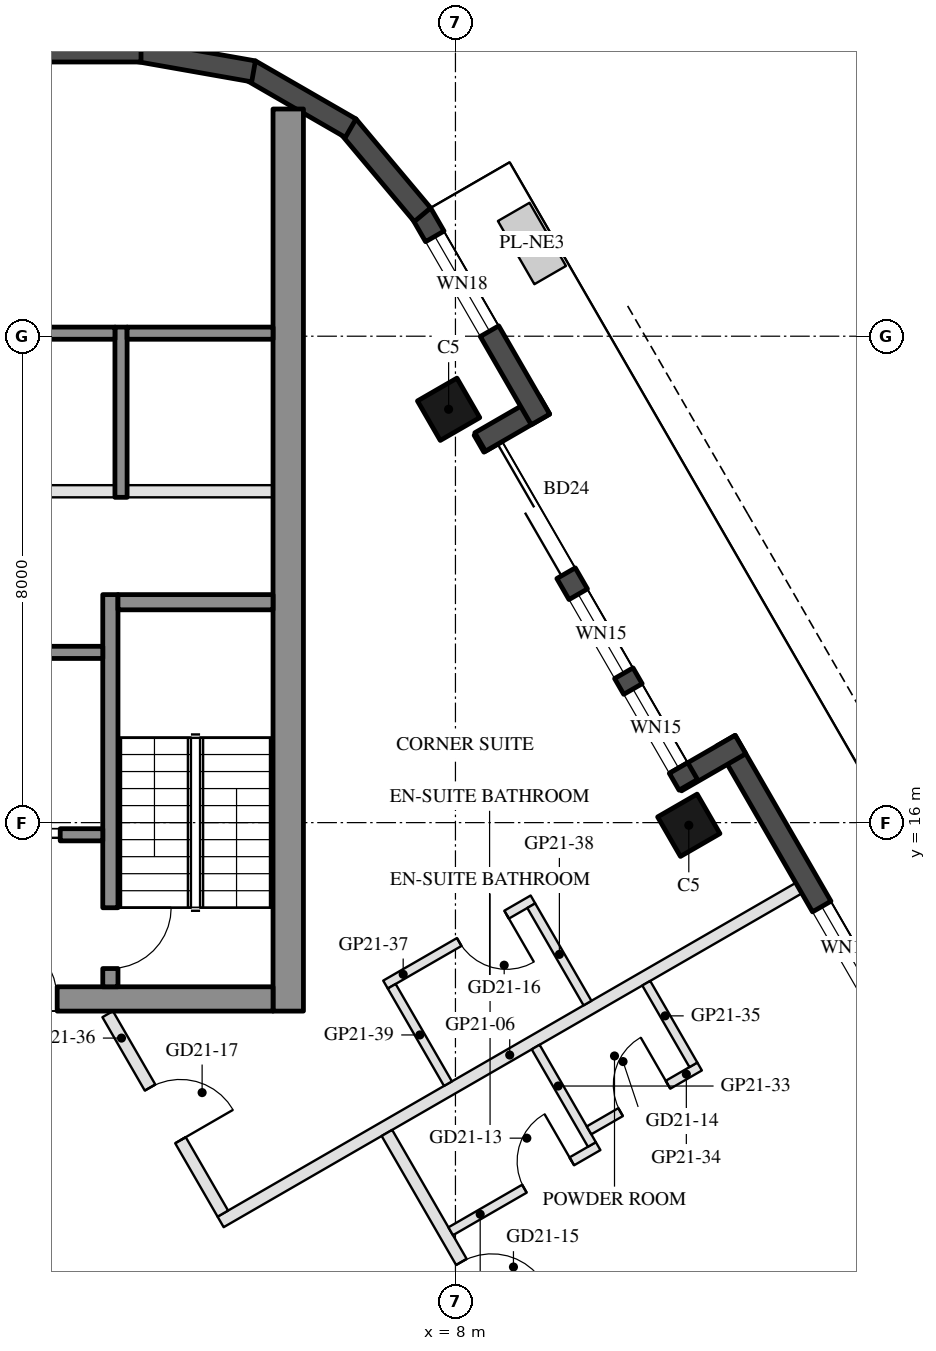
"""IFC4 building model, lengths in metres.
Left out: names, types, materials, properties, quantities, classifications, styles, units other than length and angle.
Written with IfcOpenShell. Run it as: python <this file> out.ifc"""

import sys

from ifc_helpers import new_model, si_unit, direction, frame, frame_2d, origin, origin_2d, place, context, subcontext, project, spatial, rectangle, hollow_rectangle, extrude, element, fill, save


model = new_model("IFC4")
c1 = context("Model", 3, precision=1e-05, world=origin(), true_north=direction((0.0, 1.0)))
c2 = subcontext(c1, "Body", "Model", "MODEL_VIEW")
j1 = project(units=[si_unit("LENGTHUNIT", "METRE"), si_unit("PLANEANGLEUNIT", "RADIAN")], contexts=[c1])
p1 = place(None, origin())
s1 = spatial("IfcSite", under=j1, at=p1, CompositionType="ELEMENT")
p2 = place(p1, origin())
s2 = spatial("IfcBuilding", under=s1, at=p2, CompositionType="ELEMENT")
p3 = place(p2, frame((0.0, 0.0, 216.9)))
s3 = spatial("IfcBuildingStorey", under=s2, at=p3, CompositionType="ELEMENT", Elevation=216.9)
for number, where, z_axis, x_axis in (
    (1, (11.838, 15.957, 0.0), (0.0, 0.0, 1.0), (-0.5, 0.866, 0.0)),
    (2, (7.888, 22.798, 0.0), (0.0, 0.0, 1.0), (-0.5, 0.866, 0.0)),
):
    element("IfcColumn", number, at=place(p3, frame(where, z_axis=z_axis, x_axis=x_axis)), inside=s3, PredefinedType="COLUMN", context=c2, shape_type="SweptSolid", body=[
        extrude(hollow_rectangle(XDim=0.75, YDim=0.75, WallThickness=0.035, at=origin_2d()), origin(), (0.0, 0.0, 1.0), 3.7),
    ])
p4 = place(p3, frame((17.299, 8.948, 0.0), z_axis=(0.0, 0.0, 1.0), x_axis=(-0.500010041276, 0.866019606374, 0.0)))
e3 = element("IfcWall", 3, at=p4, inside=s3, PredefinedType="SOLIDWALL", context=c2, shape_type="SweptSolid", body=[
    extrude(rectangle(XDim=9.7, YDim=0.35, at=frame_2d((4.85, 0.0))), origin(), (0.0, 0.0, 1.0), 3.55),
])
p5 = place(p4, frame((1.625, 0.0, 0.3)))
e4 = element("IfcOpeningElement", 4, at=p5, cuts=e3, PredefinedType="OPENING", context=c2, shape_type="SweptSolid", body=[
    extrude(rectangle(XDim=2.6, YDim=2.65, at=frame_2d((1.3, 1.325))), frame((0.0, 0.185, 0.0), z_axis=(0.0, -1.0, 0.0), x_axis=(1.0, 0.0, 0.0)), (0.0, 0.0, 1.0), 0.37),
])
p6 = place(p4, frame((4.949, 0.0, 0.3)))
e5 = element("IfcOpeningElement", 5, at=p6, cuts=e3, PredefinedType="OPENING", context=c2, shape_type="SweptSolid", body=[
    extrude(rectangle(XDim=1.6, YDim=2.65, at=frame_2d((0.8, 1.325))), frame((0.0, 0.185, 0.0), z_axis=(0.0, -1.0, 0.0), x_axis=(1.0, 0.0, 0.0)), (0.0, 0.0, 1.0), 0.37),
])
p7 = place(p3, frame((12.688, 17.284, 0.0), z_axis=(0.0, 0.0, 1.0), x_axis=(-0.865955602162, -0.500120880472, 0.0)))
e6 = element("IfcWall", 6, at=p7, inside=s3, PredefinedType="SOLIDWALL", context=c2, shape_type="SweptSolid", body=[
    extrude(rectangle(XDim=1.22, YDim=0.35, at=frame_2d((0.61, 0.0))), origin(), (0.0, 0.0, 1.0), 3.55),
])
p8 = place(p3, frame((11.829, 16.621, 0.0), z_axis=(0.0, 0.0, 1.0), x_axis=(-0.500003597184, 0.866023326939, 0.0)))
e7 = element("IfcWall", 7, at=p8, inside=s3, PredefinedType="SOLIDWALL", context=c2, shape_type="SweptSolid", body=[
    extrude(rectangle(XDim=6.74, YDim=0.35, at=frame_2d((3.37, 0.0))), origin(), (0.0, 0.0, 1.0), 3.55),
])
p9 = place(p8, frame((4.02, 0.0, 0.0)))
e8 = element("IfcOpeningElement", 8, at=p9, cuts=e7, PredefinedType="OPENING", context=c2, shape_type="SweptSolid", body=[
    extrude(rectangle(XDim=2.4, YDim=2.4, at=frame_2d((1.2, 1.2))), frame((0.0, 0.185, 0.0), z_axis=(0.0, -1.0, 0.0), x_axis=(1.0, 0.0, 0.0)), (0.0, 0.0, 1.0), 0.37),
])
p10 = place(p8, frame((0.32, 0.0, 0.3)))
e9 = element("IfcOpeningElement", 9, at=p10, cuts=e7, PredefinedType="OPENING", context=c2, shape_type="SweptSolid", body=[
    extrude(rectangle(XDim=1.5, YDim=2.65, at=frame_2d((0.75, 1.325))), frame((0.0, 0.185, 0.0), z_axis=(0.0, -1.0, 0.0), x_axis=(1.0, 0.0, 0.0)), (0.0, 0.0, 1.0), 0.37),
])
p11 = place(p8, frame((2.12, 0.0, 0.3)))
e10 = element("IfcOpeningElement", 10, at=p11, cuts=e7, PredefinedType="OPENING", context=c2, shape_type="SweptSolid", body=[
    extrude(rectangle(XDim=1.5, YDim=2.65, at=frame_2d((0.75, 1.325))), frame((0.0, 0.185, 0.0), z_axis=(0.0, -1.0, 0.0), x_axis=(1.0, 0.0, 0.0)), (0.0, 0.0, 1.0), 0.37),
])
p12 = place(p3, frame((8.406, 22.26, 0.0), z_axis=(0.0, 0.0, 1.0), x_axis=(0.865955602162, 0.500120880472, 0.0)))
e11 = element("IfcWall", 11, at=p12, inside=s3, PredefinedType="SOLIDWALL", context=c2, shape_type="SweptSolid", body=[
    extrude(rectangle(XDim=1.22, YDim=0.35, at=frame_2d((0.61, 0.0))), origin(), (0.0, 0.0, 1.0), 3.55),
])
p13 = place(p3, frame((9.398, 22.631, 0.0), z_axis=(0.0, 0.0, 1.0), x_axis=(-0.499954521343, 0.866051659307, 0.0)))
e12 = element("IfcWall", 12, at=p13, inside=s3, PredefinedType="SOLIDWALL", context=c2, shape_type="SweptSolid", body=[
    extrude(rectangle(XDim=3.916, YDim=0.35, at=frame_2d((1.958, 0.0))), origin(), (0.0, 0.0, 1.0), 3.55),
])
p14 = place(p13, frame((1.676, 0.0, 0.3)))
e13 = element("IfcOpeningElement", 13, at=p14, cuts=e12, PredefinedType="OPENING", context=c2, shape_type="SweptSolid", body=[
    extrude(rectangle(XDim=1.8, YDim=2.65, at=frame_2d((0.9, 1.325))), frame((0.0, 0.185, 0.0), z_axis=(0.0, -1.0, 0.0), x_axis=(1.0, 0.0, 0.0)), (0.0, 0.0, 1.0), 0.37),
])
p15 = place(p3, frame((7.458, 25.998, 0.0), z_axis=(0.0, 0.0, 1.0), x_axis=(-0.642808304945, 0.766027077259, 0.0)))
e14 = element("IfcWall", 14, at=p15, inside=s3, PredefinedType="SOLIDWALL", context=c2, shape_type="SweptSolid", body=[
    extrude(rectangle(XDim=1.91, YDim=0.35, at=frame_2d((0.955, 0.0))), origin(), (0.0, 0.0, 1.0), 3.55),
])
for number, where, z_axis, x_axis in (
    (15, (6.277, 27.422, 0.0), (0.0, 0.0, 1.0), (-0.866, 0.5, 0.0)),
    (16, (4.68, 28.356, 0.0), (0.0, 0.0, 1.0), (-0.985, 0.174, 0.0)),
):
    element("IfcWall", number, at=place(p3, frame(where, z_axis=z_axis, x_axis=x_axis)), inside=s3, PredefinedType="SOLIDWALL", context=c2, shape_type="SweptSolid", body=[
        extrude(rectangle(XDim=1.91, YDim=0.35, at=frame_2d((0.955, 0.0))), origin(), (0.0, 0.0, 1.0), 3.55),
    ])
p16 = place(p3, frame((2.829, 28.685, 0.0), z_axis=(0.0, 0.0, 1.0), x_axis=(-1.0, 0.0, 0.0)))
e17 = element("IfcWall", 17, at=p16, inside=s3, PredefinedType="SOLIDWALL", context=c2, shape_type="SweptSolid", body=[
    extrude(rectangle(XDim=5.658, YDim=0.35, at=frame_2d((2.829, 0.0))), origin(), (0.0, 0.0, 1.0), 3.55),
])
p17 = place(p3, frame((5.25, 12.9, 0.0), z_axis=(0.0, 0.0, 1.0), x_axis=(0.0, 1.0, 0.0)))
e18 = element("IfcWall", 18, at=p17, inside=s3, PredefinedType="SHEAR", context=c2, shape_type="SweptSolid", body=[
    extrude(rectangle(XDim=14.837, YDim=0.5, at=frame_2d((7.418, 0.0))), origin(), (0.0, 0.0, 1.0), 3.5),
])
p18 = place(p3, frame((5.0, 13.1, 0.0), z_axis=(0.0, 0.0, 1.0), x_axis=(-1.0, 0.0, 0.0)))
e19 = element("IfcWall", 19, at=p18, inside=s3, PredefinedType="SHEAR", context=c2, shape_type="SweptSolid", body=[
    extrude(rectangle(XDim=10.0, YDim=0.4, at=frame_2d((5.0, 0.0))), origin(), (0.0, 0.0, 1.0), 3.5),
])
p19 = place(p18, frame((3.55, 0.0, 0.0)))
e20 = element("IfcOpeningElement", 20, at=p19, cuts=e19, PredefinedType="OPENING", context=c2, shape_type="SweptSolid", body=[
    extrude(rectangle(XDim=1.1, YDim=2.1, at=frame_2d((0.55, 1.05))), frame((0.0, 0.21, 0.0), z_axis=(0.0, -1.0, 0.0), x_axis=(1.0, 0.0, 0.0)), (0.0, 0.0, 1.0), 0.42),
])
p20 = place(p18, frame((5.85, 0.0, 0.0)))
e21 = element("IfcOpeningElement", 21, at=p20, cuts=e19, PredefinedType="OPENING", context=c2, shape_type="SweptSolid", body=[
    extrude(rectangle(XDim=1.4, YDim=2.1, at=frame_2d((0.7, 1.05))), frame((0.0, 0.21, 0.0), z_axis=(0.0, -1.0, 0.0), x_axis=(1.0, 0.0, 0.0)), (0.0, 0.0, 1.0), 0.42),
])
p21 = place(p3, frame((2.325, 13.3, 0.0), z_axis=(0.0, 0.0, 1.0), x_axis=(0.0, 1.0, 0.0)))
e22 = element("IfcWall", 22, at=p21, inside=s3, PredefinedType="SHEAR", context=c2, shape_type="SweptSolid", body=[
    extrude(rectangle(XDim=6.45, YDim=0.25, at=frame_2d((3.225, 0.0))), origin(), (0.0, 0.0, 1.0), 3.5),
])
p22 = place(p21, frame((0.3, 0.0, 0.0)))
e23 = element("IfcOpeningElement", 23, at=p22, cuts=e22, PredefinedType="OPENING", context=c2, shape_type="SweptSolid", body=[
    extrude(rectangle(XDim=1.0, YDim=2.1, at=frame_2d((0.5, 1.05))), frame((0.0, 0.135, 0.0), z_axis=(0.0, -1.0, 0.0), x_axis=(1.0, 0.0, 0.0)), (0.0, 0.0, 1.0), 0.27),
])
p23 = place(p3, frame((5.0, 19.625, 0.0), z_axis=(0.0, 0.0, 1.0), x_axis=(-1.0, 0.0, 0.0)))
e24 = element("IfcWall", 24, at=p23, inside=s3, PredefinedType="SHEAR", context=c2, shape_type="SweptSolid", body=[
    extrude(rectangle(XDim=2.55, YDim=0.25, at=frame_2d((1.275, 0.0))), origin(), (0.0, 0.0, 1.0), 3.5),
])
p24 = place(p3, frame((2.2, 18.8, 0.0), z_axis=(0.0, 0.0, 1.0), x_axis=(-1.0, 0.0, 0.0)))
e25 = element("IfcWall", 25, at=p24, inside=s3, PredefinedType="SHEAR", context=c2, shape_type="SweptSolid", body=[
    extrude(rectangle(XDim=2.8, YDim=0.2, at=frame_2d((1.4, 0.0))), origin(), (0.0, 0.0, 1.0), 3.5),
])
p25 = place(p3, frame((2.2, 15.8, 0.0), z_axis=(0.0, 0.0, 1.0), x_axis=(-1.0, 0.0, 0.0)))
e26 = element("IfcWall", 26, at=p25, inside=s3, PredefinedType="SHEAR", context=c2, shape_type="SweptSolid", body=[
    extrude(rectangle(XDim=2.8, YDim=0.2, at=frame_2d((1.4, 0.0))), origin(), (0.0, 0.0, 1.0), 3.5),
])
p26 = place(p25, frame((0.7, 0.0, 0.0)))
e27 = element("IfcOpeningElement", 27, at=p26, cuts=e26, PredefinedType="OPENING", context=c2, shape_type="SweptSolid", body=[
    extrude(rectangle(XDim=1.2, YDim=2.1, at=frame_2d((0.6, 1.05))), frame((0.0, 0.11, 0.0), z_axis=(0.0, -1.0, 0.0), x_axis=(1.0, 0.0, 0.0)), (0.0, 0.0, 1.0), 0.22),
])
p27 = place(p3, frame((2.5, 21.35, 0.0), z_axis=(0.0, 0.0, 1.0), x_axis=(0.0, 1.0, 0.0)))
e28 = element("IfcWall", 28, at=p27, inside=s3, PredefinedType="SHEAR", context=c2, shape_type="SweptSolid", body=[
    extrude(rectangle(XDim=2.8, YDim=0.2, at=frame_2d((1.4, 0.0))), origin(), (0.0, 0.0, 1.0), 3.5),
])
p28 = place(p3, frame((5.0, 24.05, 0.0), z_axis=(0.0, 0.0, 1.0), x_axis=(-1.0, 0.0, 0.0)))
e29 = element("IfcWall", 29, at=p28, inside=s3, PredefinedType="SHEAR", context=c2, shape_type="SweptSolid", body=[
    extrude(rectangle(XDim=2.4, YDim=0.2, at=frame_2d((1.2, 0.0))), origin(), (0.0, 0.0, 1.0), 3.5),
])
p29 = place(p3, frame((2.4, 24.05, 0.0), z_axis=(0.0, 0.0, 1.0), x_axis=(-1.0, 0.0, 0.0)))
e30 = element("IfcWall", 30, at=p29, inside=s3, PredefinedType="SHEAR", context=c2, shape_type="SweptSolid", body=[
    extrude(rectangle(XDim=2.8, YDim=0.2, at=frame_2d((1.4, 0.0))), origin(), (0.0, 0.0, 1.0), 3.5),
])
p30 = place(p3, frame((5.0, 21.45, 0.0), z_axis=(0.0, 0.0, 1.0), x_axis=(-1.0, 0.0, 0.0)))
e31 = element("IfcWall", 31, at=p30, inside=s3, PredefinedType="PARTITIONING", context=c2, shape_type="SweptSolid", body=[
    extrude(rectangle(XDim=2.4, YDim=0.2, at=frame_2d((1.2, 0.0))), origin(), (0.0, 0.0, 1.0), 3.5),
])
p31 = place(p3, frame((2.4, 21.45, 0.0), z_axis=(0.0, 0.0, 1.0), x_axis=(-1.0, 0.0, 0.0)))
e32 = element("IfcWall", 32, at=p31, inside=s3, PredefinedType="PARTITIONING", context=c2, shape_type="SweptSolid", body=[
    extrude(rectangle(XDim=2.8, YDim=0.2, at=frame_2d((1.4, 0.0))), origin(), (0.0, 0.0, 1.0), 3.5),
])
p32 = place(p3, frame((13.647, 14.923, 0.0), z_axis=(0.0, 0.0, 1.0), x_axis=(-0.866027479907, -0.499996404033, 0.0)))
e33 = element("IfcWall", 33, at=p32, inside=s3, PredefinedType="PARTITIONING", context=c2, shape_type="SweptSolid", body=[
    extrude(rectangle(XDim=10.98, YDim=0.2, at=frame_2d((5.49, 0.0))), origin(), (0.0, 0.0, 1.0), 3.06),
])
p33 = place(p3, frame((6.873, 10.896, 0.0), z_axis=(0.0, 0.0, 1.0), x_axis=(0.499996545922, -0.866027397988, 0.0)))
e34 = element("IfcWall", 34, at=p33, inside=s3, PredefinedType="PARTITIONING", context=c2, shape_type="SweptSolid", body=[
    extrude(rectangle(XDim=11.0, YDim=0.2, at=frame_2d((5.5, 0.0))), origin(), (0.0, 0.0, 1.0), 2.95),
])
p34 = place(p33, frame((2.45, 0.0, 0.0)))
e35 = element("IfcOpeningElement", 35, at=p34, cuts=e34, PredefinedType="OPENING", context=c2, shape_type="SweptSolid", body=[
    extrude(rectangle(XDim=1.0, YDim=2.1, at=frame_2d((0.5, 1.05))), frame((0.0, 0.11, 0.0), z_axis=(0.0, -1.0, 0.0), x_axis=(1.0, 0.0, 0.0)), (0.0, 0.0, 1.0), 0.22),
])
p35 = place(p3, frame((7.922, 9.279, 0.0), z_axis=(0.0, 0.0, 1.0), x_axis=(0.865996816683, 0.500049511043, 0.0)))
e36 = element("IfcWall", 36, at=p35, inside=s3, PredefinedType="PARTITIONING", context=c2, shape_type="SweptSolid", body=[
    extrude(rectangle(XDim=2.8, YDim=0.15, at=frame_2d((1.4, 0.0))), origin(), (0.0, 0.0, 1.0), 2.95),
])
p36 = place(p35, frame((1.4, 0.0, 0.0)))
e37 = element("IfcOpeningElement", 37, at=p36, cuts=e36, PredefinedType="OPENING", context=c2, shape_type="SweptSolid", body=[
    extrude(rectangle(XDim=0.9, YDim=2.1, at=frame_2d((0.45, 1.05))), frame((0.0, 0.085, 0.0), z_axis=(0.0, -1.0, 0.0), x_axis=(1.0, 0.0, 0.0)), (0.0, 0.0, 1.0), 0.17),
])
p37 = place(p3, frame((10.244, 10.707, 0.0), z_axis=(0.0, 0.0, 1.0), x_axis=(-0.500042316284, 0.866000971088, 0.0)))
e38 = element("IfcWall", 38, at=p37, inside=s3, PredefinedType="PARTITIONING", context=c2, shape_type="SweptSolid", body=[
    extrude(rectangle(XDim=1.85, YDim=0.15, at=frame_2d((0.925, 0.0))), origin(), (0.0, 0.0, 1.0), 3.55),
])
p38 = place(p3, frame((10.197, 10.939, 0.0), z_axis=(0.0, 0.0, 1.0), x_axis=(0.866009402589, 0.500027713859, 0.0)))
e39 = element("IfcWall", 39, at=p38, inside=s3, PredefinedType="PARTITIONING", context=c2, shape_type="SweptSolid", body=[
    extrude(rectangle(XDim=2.1, YDim=0.15, at=frame_2d((1.05, 0.0))), origin(), (0.0, 0.0, 1.0), 3.55),
])
p39 = place(p38, frame((0.6, 0.0, 0.0)))
e40 = element("IfcOpeningElement", 40, at=p39, cuts=e39, PredefinedType="OPENING", context=c2, shape_type="SweptSolid", body=[
    extrude(rectangle(XDim=0.9, YDim=2.1, at=frame_2d((0.45, 1.05))), frame((0.0, 0.085, 0.0), z_axis=(0.0, -1.0, 0.0), x_axis=(1.0, 0.0, 0.0)), (0.0, 0.0, 1.0), 0.17),
])
p40 = place(p3, frame((11.913, 12.016, 0.0), z_axis=(0.0, 0.0, 1.0), x_axis=(-0.499967891604, 0.866043940782, 0.0)))
e41 = element("IfcWall", 41, at=p40, inside=s3, PredefinedType="PARTITIONING", context=c2, shape_type="SweptSolid", body=[
    extrude(rectangle(XDim=1.55, YDim=0.15, at=frame_2d((0.775, 0.0))), origin(), (0.0, 0.0, 1.0), 3.55),
])
p41 = place(p3, frame((2.281, 12.85, 0.0), z_axis=(0.0, 0.0, 1.0), x_axis=(0.499979074716, -0.866037484666, 0.0)))
e42 = element("IfcWall", 42, at=p41, inside=s3, PredefinedType="PARTITIONING", context=c2, shape_type="SweptSolid", body=[
    extrude(rectangle(XDim=3.788, YDim=0.2, at=frame_2d((1.894, 0.0))), origin(), (0.0, 0.0, 1.0), 2.95),
])
p42 = place(p41, frame((1.394, 0.0, 0.0)))
e43 = element("IfcOpeningElement", 43, at=p42, cuts=e42, PredefinedType="OPENING", context=c2, shape_type="SweptSolid", body=[
    extrude(rectangle(XDim=1.0, YDim=2.1, at=frame_2d((0.5, 1.05))), frame((0.0, 0.11, 0.0), z_axis=(0.0, -1.0, 0.0), x_axis=(1.0, 0.0, 0.0)), (0.0, 0.0, 1.0), 0.22),
])
p43 = place(p3, frame((9.274, 14.737, 0.0), z_axis=(0.0, 0.0, 1.0), x_axis=(-0.866018616679, -0.500011755427, 0.0)))
e44 = element("IfcWall", 44, at=p43, inside=s3, PredefinedType="PARTITIONING", context=c2, shape_type="SweptSolid", body=[
    extrude(rectangle(XDim=2.8, YDim=0.15, at=frame_2d((1.4, 0.0))), origin(), (0.0, 0.0, 1.0), 3.55),
])
p44 = place(p43, frame((0.5, 0.0, 0.0)))
e45 = element("IfcOpeningElement", 45, at=p44, cuts=e44, PredefinedType="OPENING", context=c2, shape_type="SweptSolid", body=[
    extrude(rectangle(XDim=0.9, YDim=2.1, at=frame_2d((0.45, 1.05))), frame((0.0, 0.085, 0.0), z_axis=(0.0, -1.0, 0.0), x_axis=(1.0, 0.0, 0.0)), (0.0, 0.0, 1.0), 0.17),
])
p45 = place(p3, frame((10.172, 13.032, 0.0), z_axis=(0.0, 0.0, 1.0), x_axis=(-0.500042316284, 0.866000971088, 0.0)))
e46 = element("IfcWall", 46, at=p45, inside=s3, PredefinedType="PARTITIONING", context=c2, shape_type="SweptSolid", body=[
    extrude(rectangle(XDim=1.85, YDim=0.15, at=frame_2d((0.925, 0.0))), origin(), (0.0, 0.0, 1.0), 2.95),
])
p46 = place(p3, frame((7.877, 11.707, 0.0), z_axis=(0.0, 0.0, 1.0), x_axis=(-0.499985172903, 0.866033964044, 0.0)))
e47 = element("IfcWall", 47, at=p46, inside=s3, PredefinedType="PARTITIONING", context=c2, shape_type="SweptSolid", body=[
    extrude(rectangle(XDim=1.85, YDim=0.15, at=frame_2d((0.925, 0.0))), origin(), (0.0, 0.0, 1.0), 2.95),
])
p47 = place(p6, origin())
e48 = element("IfcWindow", 48, at=p47, inside=s3, PartitioningType="SINGLE_PANEL", PredefinedType="WINDOW", context=c2, shape_type="SweptSolid", body=[
    extrude(rectangle(XDim=1.6, YDim=2.65, at=frame_2d((0.8, 1.325))), frame((0.0, 0.03, 0.0), z_axis=(0.0, -1.0, 0.0), x_axis=(1.0, 0.0, 0.0)), (0.0, 0.0, 1.0), 0.06),
])
fill(e5, e48)
p48 = place(p9, frame((2.4, 0.0, 0.0), z_axis=(0.0, 0.0, 1.0), x_axis=(-1.0, 0.0, 0.0)))
e49 = element("IfcDoor", 49, at=p48, inside=s3, OperationType="SLIDING_TO_LEFT", PredefinedType="DOOR", context=c2, shape_type="SweptSolid", body=[
    extrude(rectangle(XDim=2.4, YDim=2.4, at=frame_2d((1.2, 1.2))), frame((0.0, 0.025, 0.0), z_axis=(0.0, -1.0, 0.0), x_axis=(1.0, 0.0, 0.0)), (0.0, 0.0, 1.0), 0.05),
])
fill(e8, e49)
p49 = place(p10, origin())
e50 = element("IfcWindow", 50, at=p49, inside=s3, PartitioningType="SINGLE_PANEL", PredefinedType="WINDOW", context=c2, shape_type="SweptSolid", body=[
    extrude(rectangle(XDim=1.5, YDim=2.65, at=frame_2d((0.75, 1.325))), frame((0.0, 0.03, 0.0), z_axis=(0.0, -1.0, 0.0), x_axis=(1.0, 0.0, 0.0)), (0.0, 0.0, 1.0), 0.06),
])
fill(e9, e50)
p50 = place(p11, origin())
e51 = element("IfcWindow", 51, at=p50, inside=s3, PartitioningType="SINGLE_PANEL", PredefinedType="WINDOW", context=c2, shape_type="SweptSolid", body=[
    extrude(rectangle(XDim=1.5, YDim=2.65, at=frame_2d((0.75, 1.325))), frame((0.0, 0.03, 0.0), z_axis=(0.0, -1.0, 0.0), x_axis=(1.0, 0.0, 0.0)), (0.0, 0.0, 1.0), 0.06),
])
fill(e10, e51)
p51 = place(p14, origin())
e52 = element("IfcWindow", 52, at=p51, inside=s3, PartitioningType="SINGLE_PANEL", PredefinedType="WINDOW", context=c2, shape_type="SweptSolid", body=[
    extrude(rectangle(XDim=1.8, YDim=2.65, at=frame_2d((0.9, 1.325))), frame((0.0, 0.03, 0.0), z_axis=(0.0, -1.0, 0.0), x_axis=(1.0, 0.0, 0.0)), (0.0, 0.0, 1.0), 0.06),
])
fill(e13, e52)
p52 = place(p26, origin())
e53 = element("IfcDoor", 53, at=p52, inside=s3, OperationType="DOUBLE_DOOR_SLIDING", PredefinedType="DOOR", context=c2, shape_type="SweptSolid", body=[
    extrude(rectangle(XDim=1.2, YDim=2.1, at=frame_2d((0.6, 1.05))), frame((0.0, 0.025, 0.0), z_axis=(0.0, -1.0, 0.0), x_axis=(1.0, 0.0, 0.0)), (0.0, 0.0, 1.0), 0.05),
])
fill(e27, e53)
p53 = place(p19, frame((1.1, 0.0, 0.0), z_axis=(0.0, 0.0, 1.0), x_axis=(-1.0, 0.0, 0.0)))
e54 = element("IfcDoor", 54, at=p53, inside=s3, OperationType="SINGLE_SWING_LEFT", PredefinedType="DOOR", context=c2, shape_type="SweptSolid", body=[
    extrude(rectangle(XDim=1.1, YDim=2.1, at=frame_2d((0.55, 1.05))), frame((0.0, 0.025, 0.0), z_axis=(0.0, -1.0, 0.0), x_axis=(1.0, 0.0, 0.0)), (0.0, 0.0, 1.0), 0.05),
])
fill(e20, e54)
p54 = place(p22, frame((1.0, 0.0, 0.0), z_axis=(0.0, 0.0, 1.0), x_axis=(-1.0, 0.0, 0.0)))
e55 = element("IfcDoor", 55, at=p54, inside=s3, OperationType="SINGLE_SWING_LEFT", PredefinedType="DOOR", context=c2, shape_type="SweptSolid", body=[
    extrude(rectangle(XDim=1.0, YDim=2.1, at=frame_2d((0.5, 1.05))), frame((0.0, 0.025, 0.0), z_axis=(0.0, -1.0, 0.0), x_axis=(1.0, 0.0, 0.0)), (0.0, 0.0, 1.0), 0.05),
])
fill(e23, e55)
p55 = place(p36, origin())
e56 = element("IfcDoor", 56, at=p55, inside=s3, OperationType="SINGLE_SWING_RIGHT", PredefinedType="DOOR", context=c2, shape_type="SweptSolid", body=[
    extrude(rectangle(XDim=0.9, YDim=2.1, at=frame_2d((0.45, 1.05))), frame((0.0, 0.025, 0.0), z_axis=(0.0, -1.0, 0.0), x_axis=(1.0, 0.0, 0.0)), (0.0, 0.0, 1.0), 0.05),
])
fill(e37, e56)
p56 = place(p39, origin())
e57 = element("IfcDoor", 57, at=p56, inside=s3, OperationType="SINGLE_SWING_RIGHT", PredefinedType="DOOR", context=c2, shape_type="SweptSolid", body=[
    extrude(rectangle(XDim=0.9, YDim=2.1, at=frame_2d((0.45, 1.05))), frame((0.0, 0.025, 0.0), z_axis=(0.0, -1.0, 0.0), x_axis=(1.0, 0.0, 0.0)), (0.0, 0.0, 1.0), 0.05),
])
fill(e40, e57)
p57 = place(p34, origin())
e58 = element("IfcDoor", 58, at=p57, inside=s3, OperationType="SINGLE_SWING_RIGHT", PredefinedType="DOOR", context=c2, shape_type="SweptSolid", body=[
    extrude(rectangle(XDim=1.0, YDim=2.1, at=frame_2d((0.5, 1.05))), frame((0.0, 0.025, 0.0), z_axis=(0.0, -1.0, 0.0), x_axis=(1.0, 0.0, 0.0)), (0.0, 0.0, 1.0), 0.05),
])
fill(e35, e58)
p58 = place(p44, origin())
e59 = element("IfcDoor", 59, at=p58, inside=s3, OperationType="SINGLE_SWING_LEFT", PredefinedType="DOOR", context=c2, shape_type="SweptSolid", body=[
    extrude(rectangle(XDim=0.9, YDim=2.1, at=frame_2d((0.45, 1.05))), frame((0.0, 0.025, 0.0), z_axis=(0.0, -1.0, 0.0), x_axis=(1.0, 0.0, 0.0)), (0.0, 0.0, 1.0), 0.05),
])
fill(e45, e59)
p59 = place(p42, origin())
e60 = element("IfcDoor", 60, at=p59, inside=s3, OperationType="SINGLE_SWING_RIGHT", PredefinedType="DOOR", context=c2, shape_type="SweptSolid", body=[
    extrude(rectangle(XDim=1.0, YDim=2.1, at=frame_2d((0.5, 1.05))), frame((0.0, 0.025, 0.0), z_axis=(0.0, -1.0, 0.0), x_axis=(1.0, 0.0, 0.0)), (0.0, 0.0, 1.0), 0.05),
])
fill(e43, e60)
save(model, sys.argv[1])
